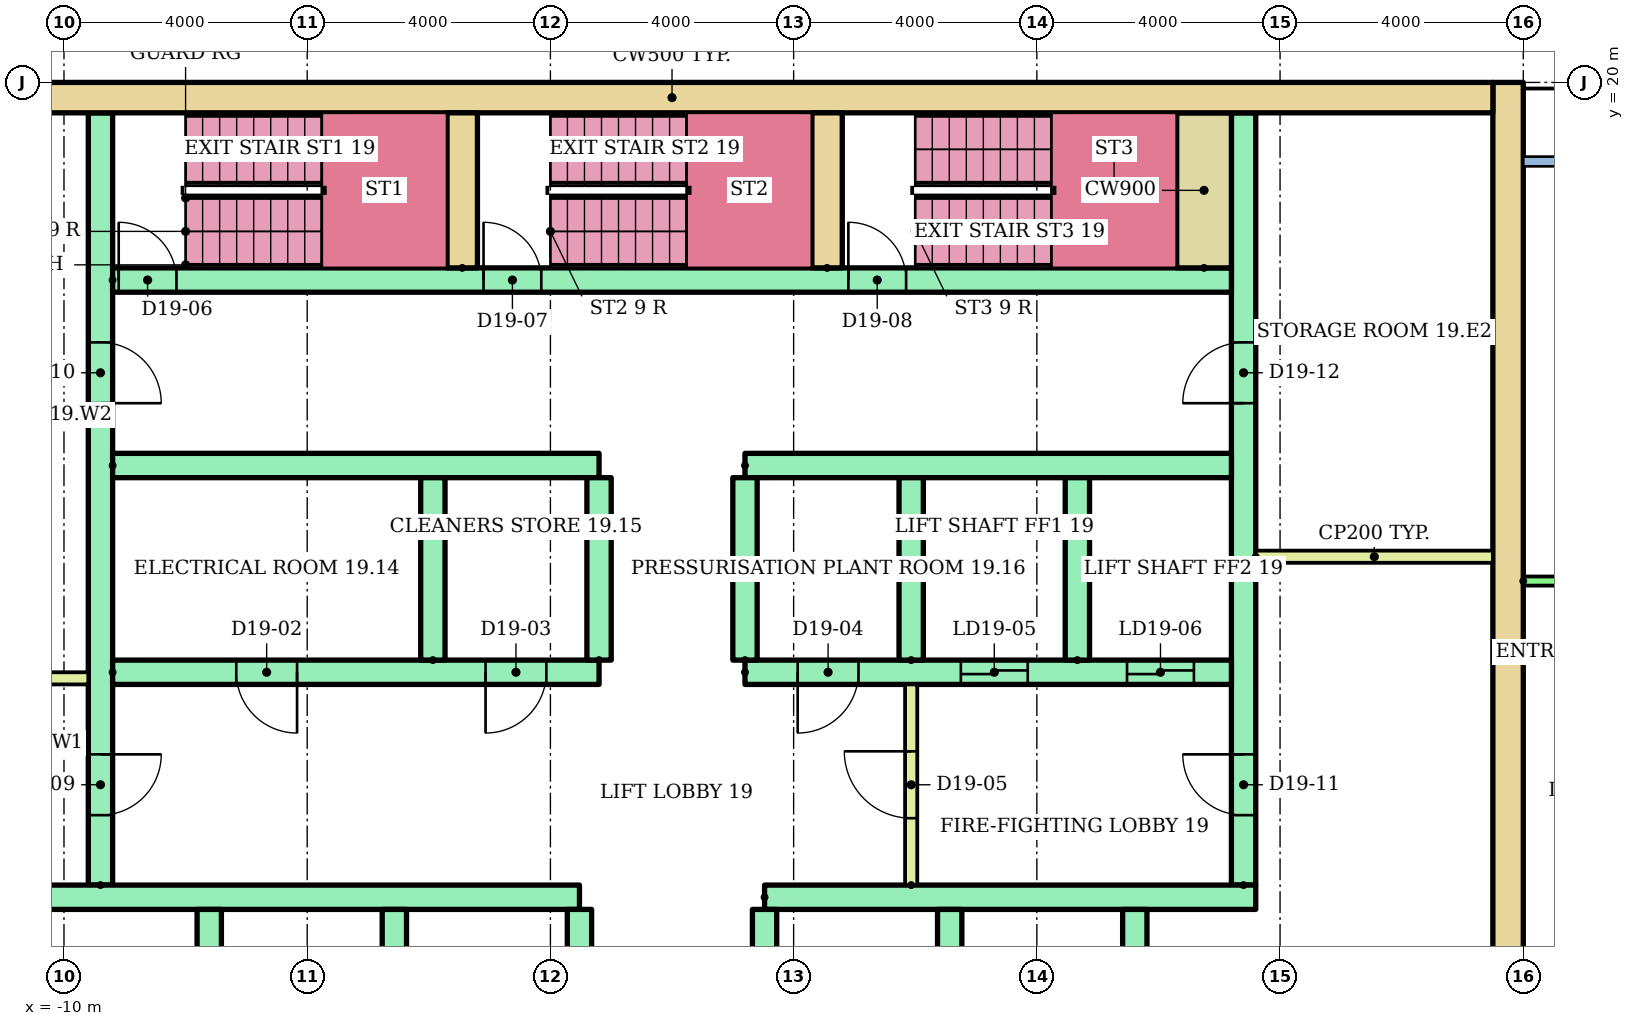
"""IFC4 building model, lengths in metres.
Left out: names, types, materials, properties, quantities, classifications, styles, units other than length and angle.
Written with IfcOpenShell. Run it as: python <this file> out.ifc"""

import sys

from ifc_helpers import new_model, si_unit, direction, frame, frame_2d, origin, place, context, subcontext, project, spatial, rectangle, extrude, element, fill, save


model = new_model("IFC4")
c1 = context("Model", 3, precision=1e-05, world=origin(), true_north=direction((0.0, 1.0)))
c2 = subcontext(c1, "Body", "Model", "MODEL_VIEW")
j1 = project(units=[si_unit("LENGTHUNIT", "METRE"), si_unit("PLANEANGLEUNIT", "RADIAN")], contexts=[c1])
p1 = place(None, origin())
s1 = spatial("IfcSite", under=j1, at=p1, CompositionType="ELEMENT")
p2 = place(p1, origin())
s2 = spatial("IfcBuilding", under=s1, at=p2, CompositionType="ELEMENT")
p3 = place(p2, frame((0.0, 0.0, 77.5)))
s3 = spatial("IfcBuildingStorey", under=s2, at=p3, CompositionType="ELEMENT", Elevation=77.5)
p4 = place(p3, frame((13.75, 3.0, 0.0), z_axis=(0.0, 0.0, 1.0), x_axis=(0.0, 1.0, 0.0)))
e1 = element("IfcWall", 1, at=p4, inside=s3, PredefinedType="SHEAR", context=c2, shape_type="SweptSolid", body=[
    extrude(rectangle(XDim=17.0, YDim=0.5, at=frame_2d((8.5, 0.0))), origin(), (0.0, 0.0, 1.0), 2.92),
])
p5 = place(p3, frame((-13.5, 19.75, 0.0)))
e2 = element("IfcWall", 2, at=p5, inside=s3, PredefinedType="SHEAR", context=c2, shape_type="SweptSolid", body=[
    extrude(rectangle(XDim=27.0, YDim=0.5, at=frame_2d((13.5, 0.0))), origin(), (0.0, 0.0, 1.0), 2.92),
])
p6 = place(p3, frame((-9.4, 6.8, 0.0), z_axis=(0.0, 0.0, 1.0), x_axis=(0.0, 1.0, 0.0)))
e3 = element("IfcWall", 3, at=p6, inside=s3, PredefinedType="SHEAR", context=c2, shape_type="SweptSolid", body=[
    extrude(rectangle(XDim=12.7, YDim=0.4, at=frame_2d((6.35, 0.0))), origin(), (0.0, 0.0, 1.0), 2.92),
])
p7 = place(p6, frame((1.15, 0.0, 0.0)))
e4 = element("IfcOpeningElement", 4, at=p7, cuts=e3, PredefinedType="OPENING", context=c2, shape_type="SweptSolid", body=[
    extrude(rectangle(XDim=1.0, YDim=2.1, at=frame_2d((0.5, 1.05))), frame((0.0, 0.21, 0.0), z_axis=(0.0, -1.0, 0.0), x_axis=(1.0, 0.0, 0.0)), (0.0, 0.0, 1.0), 0.42),
])
p8 = place(p6, frame((7.925, 0.0, 0.0)))
e5 = element("IfcOpeningElement", 5, at=p8, cuts=e3, PredefinedType="OPENING", context=c2, shape_type="SweptSolid", body=[
    extrude(rectangle(XDim=1.0, YDim=2.1, at=frame_2d((0.5, 1.05))), frame((0.0, 0.21, 0.0), z_axis=(0.0, -1.0, 0.0), x_axis=(1.0, 0.0, 0.0)), (0.0, 0.0, 1.0), 0.42),
])
p9 = place(p3, frame((9.4, 6.8, 0.0), z_axis=(0.0, 0.0, 1.0), x_axis=(0.0, 1.0, 0.0)))
e6 = element("IfcWall", 6, at=p9, inside=s3, PredefinedType="SHEAR", context=c2, shape_type="SweptSolid", body=[
    extrude(rectangle(XDim=12.7, YDim=0.4, at=frame_2d((6.35, 0.0))), origin(), (0.0, 0.0, 1.0), 2.92),
])
p10 = place(p9, frame((1.15, 0.0, 0.0)))
e7 = element("IfcOpeningElement", 7, at=p10, cuts=e6, PredefinedType="OPENING", context=c2, shape_type="SweptSolid", body=[
    extrude(rectangle(XDim=1.0, YDim=2.1, at=frame_2d((0.5, 1.05))), frame((0.0, 0.21, 0.0), z_axis=(0.0, -1.0, 0.0), x_axis=(1.0, 0.0, 0.0)), (0.0, 0.0, 1.0), 0.42),
])
p11 = place(p9, frame((7.925, 0.0, 0.0)))
e8 = element("IfcOpeningElement", 8, at=p11, cuts=e6, PredefinedType="OPENING", context=c2, shape_type="SweptSolid", body=[
    extrude(rectangle(XDim=1.0, YDim=2.1, at=frame_2d((0.5, 1.05))), frame((0.0, 0.21, 0.0), z_axis=(0.0, -1.0, 0.0), x_axis=(1.0, 0.0, 0.0)), (0.0, 0.0, 1.0), 0.42),
])
p12 = place(p3, frame((-13.5, 6.6, 0.0)))
e9 = element("IfcWall", 9, at=p12, inside=s3, PredefinedType="SHEAR", context=c2, shape_type="SweptSolid", body=[
    extrude(rectangle(XDim=11.978, YDim=0.4, at=frame_2d((5.989, 0.0))), origin(), (0.0, 0.0, 1.0), 2.92),
])
p13 = place(p3, frame((1.522, 6.6, 0.0)))
e10 = element("IfcWall", 10, at=p13, inside=s3, PredefinedType="SHEAR", context=c2, shape_type="SweptSolid", body=[
    extrude(rectangle(XDim=8.078, YDim=0.4, at=frame_2d((4.039, 0.0))), origin(), (0.0, 0.0, 1.0), 2.92),
])
for number, where, z_axis, x_axis in (
    (11, (-7.611, 3.4, 0.0), (0.0, 0.0, 1.0), (0.0, 1.0, 0.0)),
    (12, (-4.567, 3.4, 0.0), (0.0, 0.0, 1.0), (0.0, 1.0, 0.0)),
    (13, (-1.522, 3.4, 0.0), (0.0, 0.0, 1.0), (0.0, 1.0, 0.0)),
    (14, (1.522, 3.4, 0.0), (0.0, 0.0, 1.0), (0.0, 1.0, 0.0)),
    (15, (4.567, 3.4, 0.0), (0.0, 0.0, 1.0), (0.0, 1.0, 0.0)),
    (16, (7.611, 3.4, 0.0), (0.0, 0.0, 1.0), (0.0, 1.0, 0.0)),
):
    element("IfcWall", number, at=place(p3, frame(where, z_axis=z_axis, x_axis=x_axis)), inside=s3, PredefinedType="SHEAR", context=c2, shape_type="SweptSolid", body=[
        extrude(rectangle(XDim=3.0, YDim=0.4, at=frame_2d((1.5, 0.0))), origin(), (0.0, 0.0, 1.0), 2.92),
    ])
p14 = place(p3, frame((-9.2, 10.3, 0.0)))
e17 = element("IfcWall", 17, at=p14, inside=s3, PredefinedType="SHEAR", context=c2, shape_type="SweptSolid", body=[
    extrude(rectangle(XDim=8.0, YDim=0.4, at=frame_2d((4.0, 0.0))), origin(), (0.0, 0.0, 1.0), 2.92),
])
p15 = place(p14, frame((2.033, 0.0, 0.0)))
e18 = element("IfcOpeningElement", 18, at=p15, cuts=e17, PredefinedType="OPENING", context=c2, shape_type="SweptSolid", body=[
    extrude(rectangle(XDim=1.0, YDim=2.1, at=frame_2d((0.5, 1.05))), frame((0.0, 0.21, 0.0), z_axis=(0.0, -1.0, 0.0), x_axis=(1.0, 0.0, 0.0)), (0.0, 0.0, 1.0), 0.42),
])
p16 = place(p14, frame((6.133, 0.0, 0.0)))
e19 = element("IfcOpeningElement", 19, at=p16, cuts=e17, PredefinedType="OPENING", context=c2, shape_type="SweptSolid", body=[
    extrude(rectangle(XDim=1.0, YDim=2.1, at=frame_2d((0.5, 1.05))), frame((0.0, 0.21, 0.0), z_axis=(0.0, -1.0, 0.0), x_axis=(1.0, 0.0, 0.0)), (0.0, 0.0, 1.0), 0.42),
])
p17 = place(p3, frame((-9.2, 13.7, 0.0)))
e20 = element("IfcWall", 20, at=p17, inside=s3, PredefinedType="SHEAR", context=c2, shape_type="SweptSolid", body=[
    extrude(rectangle(XDim=8.0, YDim=0.4, at=frame_2d((4.0, 0.0))), origin(), (0.0, 0.0, 1.0), 2.92),
])
p18 = place(p3, frame((1.2, 10.3, 0.0)))
e21 = element("IfcWall", 21, at=p18, inside=s3, PredefinedType="SHEAR", context=c2, shape_type="SweptSolid", body=[
    extrude(rectangle(XDim=8.0, YDim=0.4, at=frame_2d((4.0, 0.0))), origin(), (0.0, 0.0, 1.0), 2.92),
])
p19 = place(p18, frame((3.55, 0.0, 0.0)))
e22 = element("IfcOpeningElement", 22, at=p19, cuts=e21, PredefinedType="OPENING", context=c2, shape_type="SweptSolid", body=[
    extrude(rectangle(XDim=1.1, YDim=2.1, at=frame_2d((0.55, 1.05))), frame((0.0, 0.21, 0.0), z_axis=(0.0, -1.0, 0.0), x_axis=(1.0, 0.0, 0.0)), (0.0, 0.0, 1.0), 0.42),
])
p20 = place(p18, frame((6.283, 0.0, 0.0)))
e23 = element("IfcOpeningElement", 23, at=p20, cuts=e21, PredefinedType="OPENING", context=c2, shape_type="SweptSolid", body=[
    extrude(rectangle(XDim=1.1, YDim=2.1, at=frame_2d((0.55, 1.05))), frame((0.0, 0.21, 0.0), z_axis=(0.0, -1.0, 0.0), x_axis=(1.0, 0.0, 0.0)), (0.0, 0.0, 1.0), 0.42),
])
p21 = place(p18, frame((0.867, 0.0, 0.0)))
e24 = element("IfcOpeningElement", 24, at=p21, cuts=e21, PredefinedType="OPENING", context=c2, shape_type="SweptSolid", body=[
    extrude(rectangle(XDim=1.0, YDim=2.1, at=frame_2d((0.5, 1.05))), frame((0.0, 0.21, 0.0), z_axis=(0.0, -1.0, 0.0), x_axis=(1.0, 0.0, 0.0)), (0.0, 0.0, 1.0), 0.42),
])
p22 = place(p3, frame((1.2, 13.7, 0.0)))
e25 = element("IfcWall", 25, at=p22, inside=s3, PredefinedType="SHEAR", context=c2, shape_type="SweptSolid", body=[
    extrude(rectangle(XDim=8.0, YDim=0.4, at=frame_2d((4.0, 0.0))), origin(), (0.0, 0.0, 1.0), 2.92),
])
for number, where, z_axis, x_axis in (
    (26, (-3.933, 10.5, 0.0), (0.0, 0.0, 1.0), (0.0, 1.0, 0.0)),
    (27, (-1.2, 10.5, 0.0), (0.0, 0.0, 1.0), (0.0, 1.0, 0.0)),
    (28, (1.2, 10.5, 0.0), (0.0, 0.0, 1.0), (0.0, 1.0, 0.0)),
    (29, (3.933, 10.5, 0.0), (0.0, 0.0, 1.0), (0.0, 1.0, 0.0)),
    (30, (6.667, 10.5, 0.0), (0.0, 0.0, 1.0), (0.0, 1.0, 0.0)),
):
    element("IfcWall", number, at=place(p3, frame(where, z_axis=z_axis, x_axis=x_axis)), inside=s3, PredefinedType="SHEAR", context=c2, shape_type="SweptSolid", body=[
        extrude(rectangle(XDim=3.0, YDim=0.4, at=frame_2d((1.5, 0.0))), origin(), (0.0, 0.0, 1.0), 2.92),
    ])
p23 = place(p3, frame((3.933, 6.8, 0.0), z_axis=(0.0, 0.0, 1.0), x_axis=(0.0, 1.0, 0.0)))
e31 = element("IfcWall", 31, at=p23, inside=s3, PredefinedType="PARTITIONING", context=c2, shape_type="SweptSolid", body=[
    extrude(rectangle(XDim=3.3, YDim=0.2, at=frame_2d((1.65, 0.0))), origin(), (0.0, 0.0, 1.0), 2.92),
])
p24 = place(p23, frame((1.1, 0.0, 0.0)))
e32 = element("IfcOpeningElement", 32, at=p24, cuts=e31, PredefinedType="OPENING", context=c2, shape_type="SweptSolid", body=[
    extrude(rectangle(XDim=1.1, YDim=2.1, at=frame_2d((0.55, 1.05))), frame((0.0, 0.11, 0.0), z_axis=(0.0, -1.0, 0.0), x_axis=(1.0, 0.0, 0.0)), (0.0, 0.0, 1.0), 0.22),
])
p25 = place(p3, frame((-9.2, 16.75, 0.0)))
e33 = element("IfcWall", 33, at=p25, inside=s3, PredefinedType="SHEAR", context=c2, shape_type="SweptSolid", body=[
    extrude(rectangle(XDim=18.4, YDim=0.4, at=frame_2d((9.2, 0.0))), origin(), (0.0, 0.0, 1.0), 2.92),
])
p26 = place(p25, frame((0.1, 0.0, 0.0)))
e34 = element("IfcOpeningElement", 34, at=p26, cuts=e33, PredefinedType="OPENING", context=c2, shape_type="SweptSolid", body=[
    extrude(rectangle(XDim=0.95, YDim=2.1, at=frame_2d((0.475, 1.05))), frame((0.0, 0.21, 0.0), z_axis=(0.0, -1.0, 0.0), x_axis=(1.0, 0.0, 0.0)), (0.0, 0.0, 1.0), 0.42),
])
p27 = place(p25, frame((6.1, 0.0, 0.0)))
e35 = element("IfcOpeningElement", 35, at=p27, cuts=e33, PredefinedType="OPENING", context=c2, shape_type="SweptSolid", body=[
    extrude(rectangle(XDim=0.95, YDim=2.1, at=frame_2d((0.475, 1.05))), frame((0.0, 0.21, 0.0), z_axis=(0.0, -1.0, 0.0), x_axis=(1.0, 0.0, 0.0)), (0.0, 0.0, 1.0), 0.42),
])
p28 = place(p25, frame((12.1, 0.0, 0.0)))
e36 = element("IfcOpeningElement", 36, at=p28, cuts=e33, PredefinedType="OPENING", context=c2, shape_type="SweptSolid", body=[
    extrude(rectangle(XDim=0.95, YDim=2.1, at=frame_2d((0.475, 1.05))), frame((0.0, 0.21, 0.0), z_axis=(0.0, -1.0, 0.0), x_axis=(1.0, 0.0, 0.0)), (0.0, 0.0, 1.0), 0.42),
])
for number, where, z_axis, x_axis in (
    (37, (-3.45, 16.95, 0.0), (0.0, 0.0, 1.0), (0.0, 1.0, 0.0)),
    (38, (2.55, 16.95, 0.0), (0.0, 0.0, 1.0), (0.0, 1.0, 0.0)),
):
    element("IfcWall", number, at=place(p3, frame(where, z_axis=z_axis, x_axis=x_axis)), inside=s3, PredefinedType="SHEAR", context=c2, shape_type="SweptSolid", body=[
        extrude(rectangle(XDim=2.55, YDim=0.5, at=frame_2d((1.275, 0.0))), origin(), (0.0, 0.0, 1.0), 2.92),
    ])
p29 = place(p3, frame((8.75, 16.95, 0.0), z_axis=(0.0, 0.0, 1.0), x_axis=(0.0, 1.0, 0.0)))
e39 = element("IfcWall", 39, at=p29, inside=s3, PredefinedType="SHEAR", context=c2, shape_type="SweptSolid", body=[
    extrude(rectangle(XDim=2.55, YDim=0.9, at=frame_2d((1.275, 0.0))), origin(), (0.0, 0.0, 1.0), 2.92),
])
for number, where in (
    (40, (-13.5, 10.2, 0.0)),
    (41, (9.6, 12.2, 0.0)),
):
    element("IfcWall", number, at=place(p3, frame(where)), inside=s3, PredefinedType="PARTITIONING", context=c2, shape_type="SweptSolid", body=[
        extrude(rectangle(XDim=3.9, YDim=0.2, at=frame_2d((1.95, 0.0))), origin(), (0.0, 0.0, 1.0), 2.92),
    ])
p30 = place(p3, frame((14.0, 11.8, 0.0)))
e42 = element("IfcWall", 42, at=p30, inside=s3, PredefinedType="PARTITIONING", context=c2, shape_type="SweptSolid", body=[
    extrude(rectangle(XDim=12.0, YDim=0.15, at=frame_2d((6.0, 0.0))), origin(), (0.0, 0.0, 1.0), 2.4),
])
p31 = place(p30, frame((1.5, 0.0, 0.0)))
e43 = element("IfcOpeningElement", 43, at=p31, cuts=e42, PredefinedType="OPENING", context=c2, shape_type="SweptSolid", body=[
    extrude(rectangle(XDim=1.0, YDim=2.1, at=frame_2d((0.5, 1.05))), frame((0.0, 0.085, 0.0), z_axis=(0.0, -1.0, 0.0), x_axis=(1.0, 0.0, 0.0)), (0.0, 0.0, 1.0), 0.17),
])
p32 = place(p30, frame((7.5, 0.0, 0.0)))
e44 = element("IfcOpeningElement", 44, at=p32, cuts=e42, PredefinedType="OPENING", context=c2, shape_type="SweptSolid", body=[
    extrude(rectangle(XDim=1.0, YDim=2.1, at=frame_2d((0.5, 1.05))), frame((0.0, 0.085, 0.0), z_axis=(0.0, -1.0, 0.0), x_axis=(1.0, 0.0, 0.0)), (0.0, 0.0, 1.0), 0.17),
])
p33 = place(p19, origin())
e45 = element("IfcDoor", 45, at=p33, inside=s3, OperationType="SLIDING_TO_LEFT", PredefinedType="DOOR", context=c2, shape_type="SweptSolid", body=[
    extrude(rectangle(XDim=1.1, YDim=2.1, at=frame_2d((0.55, 1.05))), frame((0.0, 0.025, 0.0), z_axis=(0.0, -1.0, 0.0), x_axis=(1.0, 0.0, 0.0)), (0.0, 0.0, 1.0), 0.05),
])
fill(e22, e45)
p34 = place(p20, origin())
e46 = element("IfcDoor", 46, at=p34, inside=s3, OperationType="SLIDING_TO_LEFT", PredefinedType="DOOR", context=c2, shape_type="SweptSolid", body=[
    extrude(rectangle(XDim=1.1, YDim=2.1, at=frame_2d((0.55, 1.05))), frame((0.0, 0.025, 0.0), z_axis=(0.0, -1.0, 0.0), x_axis=(1.0, 0.0, 0.0)), (0.0, 0.0, 1.0), 0.05),
])
fill(e23, e46)
p35 = place(p15, frame((1.0, 0.0, 0.0), z_axis=(0.0, 0.0, 1.0), x_axis=(-1.0, 0.0, 0.0)))
e47 = element("IfcDoor", 47, at=p35, inside=s3, OperationType="SINGLE_SWING_RIGHT", PredefinedType="DOOR", context=c2, shape_type="SweptSolid", body=[
    extrude(rectangle(XDim=1.0, YDim=2.1, at=frame_2d((0.5, 1.05))), frame((0.0, 0.025, 0.0), z_axis=(0.0, -1.0, 0.0), x_axis=(1.0, 0.0, 0.0)), (0.0, 0.0, 1.0), 0.05),
])
fill(e18, e47)
p36 = place(p16, frame((1.0, 0.0, 0.0), z_axis=(0.0, 0.0, 1.0), x_axis=(-1.0, 0.0, 0.0)))
e48 = element("IfcDoor", 48, at=p36, inside=s3, OperationType="SINGLE_SWING_LEFT", PredefinedType="DOOR", context=c2, shape_type="SweptSolid", body=[
    extrude(rectangle(XDim=1.0, YDim=2.1, at=frame_2d((0.5, 1.05))), frame((0.0, 0.025, 0.0), z_axis=(0.0, -1.0, 0.0), x_axis=(1.0, 0.0, 0.0)), (0.0, 0.0, 1.0), 0.05),
])
fill(e19, e48)
p37 = place(p21, frame((1.0, 0.0, 0.0), z_axis=(0.0, 0.0, 1.0), x_axis=(-1.0, 0.0, 0.0)))
e49 = element("IfcDoor", 49, at=p37, inside=s3, OperationType="SINGLE_SWING_LEFT", PredefinedType="DOOR", context=c2, shape_type="SweptSolid", body=[
    extrude(rectangle(XDim=1.0, YDim=2.1, at=frame_2d((0.5, 1.05))), frame((0.0, 0.025, 0.0), z_axis=(0.0, -1.0, 0.0), x_axis=(1.0, 0.0, 0.0)), (0.0, 0.0, 1.0), 0.05),
])
fill(e24, e49)
p38 = place(p24, origin())
e50 = element("IfcDoor", 50, at=p38, inside=s3, OperationType="SINGLE_SWING_RIGHT", PredefinedType="DOOR", context=c2, shape_type="SweptSolid", body=[
    extrude(rectangle(XDim=1.1, YDim=2.1, at=frame_2d((0.55, 1.05))), frame((0.0, 0.025, 0.0), z_axis=(0.0, -1.0, 0.0), x_axis=(1.0, 0.0, 0.0)), (0.0, 0.0, 1.0), 0.05),
])
fill(e32, e50)
p39 = place(p26, origin())
e51 = element("IfcDoor", 51, at=p39, inside=s3, OperationType="SINGLE_SWING_LEFT", PredefinedType="DOOR", context=c2, shape_type="SweptSolid", body=[
    extrude(rectangle(XDim=0.95, YDim=2.1, at=frame_2d((0.475, 1.05))), frame((0.0, 0.025, 0.0), z_axis=(0.0, -1.0, 0.0), x_axis=(1.0, 0.0, 0.0)), (0.0, 0.0, 1.0), 0.05),
])
fill(e34, e51)
p40 = place(p27, origin())
e52 = element("IfcDoor", 52, at=p40, inside=s3, OperationType="SINGLE_SWING_LEFT", PredefinedType="DOOR", context=c2, shape_type="SweptSolid", body=[
    extrude(rectangle(XDim=0.95, YDim=2.1, at=frame_2d((0.475, 1.05))), frame((0.0, 0.025, 0.0), z_axis=(0.0, -1.0, 0.0), x_axis=(1.0, 0.0, 0.0)), (0.0, 0.0, 1.0), 0.05),
])
fill(e35, e52)
p41 = place(p28, origin())
e53 = element("IfcDoor", 53, at=p41, inside=s3, OperationType="SINGLE_SWING_LEFT", PredefinedType="DOOR", context=c2, shape_type="SweptSolid", body=[
    extrude(rectangle(XDim=0.95, YDim=2.1, at=frame_2d((0.475, 1.05))), frame((0.0, 0.025, 0.0), z_axis=(0.0, -1.0, 0.0), x_axis=(1.0, 0.0, 0.0)), (0.0, 0.0, 1.0), 0.05),
])
fill(e36, e53)
p42 = place(p7, frame((1.0, 0.0, 0.0), z_axis=(0.0, 0.0, 1.0), x_axis=(-1.0, 0.0, 0.0)))
e54 = element("IfcDoor", 54, at=p42, inside=s3, OperationType="SINGLE_SWING_RIGHT", PredefinedType="DOOR", context=c2, shape_type="SweptSolid", body=[
    extrude(rectangle(XDim=1.0, YDim=2.1, at=frame_2d((0.5, 1.05))), frame((0.0, 0.025, 0.0), z_axis=(0.0, -1.0, 0.0), x_axis=(1.0, 0.0, 0.0)), (0.0, 0.0, 1.0), 0.05),
])
fill(e4, e54)
p43 = place(p8, frame((1.0, 0.0, 0.0), z_axis=(0.0, 0.0, 1.0), x_axis=(-1.0, 0.0, 0.0)))
e55 = element("IfcDoor", 55, at=p43, inside=s3, OperationType="SINGLE_SWING_LEFT", PredefinedType="DOOR", context=c2, shape_type="SweptSolid", body=[
    extrude(rectangle(XDim=1.0, YDim=2.1, at=frame_2d((0.5, 1.05))), frame((0.0, 0.025, 0.0), z_axis=(0.0, -1.0, 0.0), x_axis=(1.0, 0.0, 0.0)), (0.0, 0.0, 1.0), 0.05),
])
fill(e5, e55)
p44 = place(p10, origin())
e56 = element("IfcDoor", 56, at=p44, inside=s3, OperationType="SINGLE_SWING_RIGHT", PredefinedType="DOOR", context=c2, shape_type="SweptSolid", body=[
    extrude(rectangle(XDim=1.0, YDim=2.1, at=frame_2d((0.5, 1.05))), frame((0.0, 0.025, 0.0), z_axis=(0.0, -1.0, 0.0), x_axis=(1.0, 0.0, 0.0)), (0.0, 0.0, 1.0), 0.05),
])
fill(e7, e56)
p45 = place(p11, origin())
e57 = element("IfcDoor", 57, at=p45, inside=s3, OperationType="SINGLE_SWING_LEFT", PredefinedType="DOOR", context=c2, shape_type="SweptSolid", body=[
    extrude(rectangle(XDim=1.0, YDim=2.1, at=frame_2d((0.5, 1.05))), frame((0.0, 0.025, 0.0), z_axis=(0.0, -1.0, 0.0), x_axis=(1.0, 0.0, 0.0)), (0.0, 0.0, 1.0), 0.05),
])
fill(e8, e57)
save(model, sys.argv[1])
